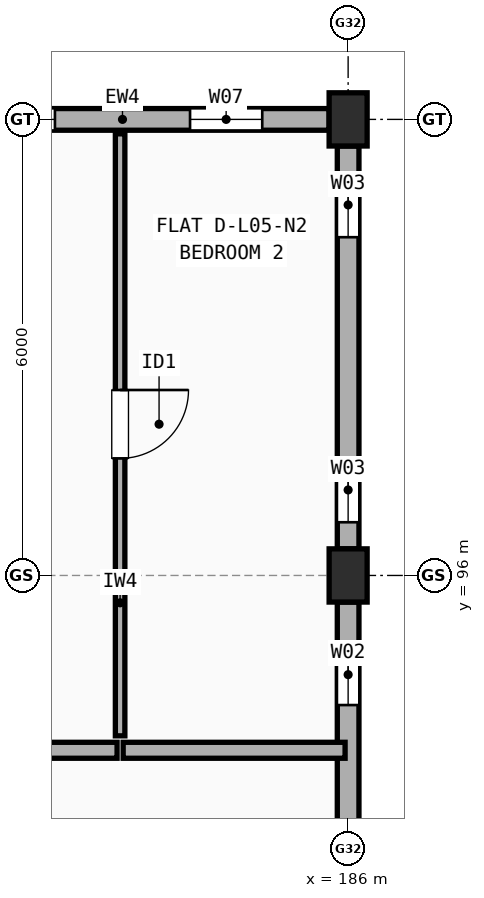
"""IFC4 building model, lengths in metres.
Left out: names, types, materials, properties, quantities, classifications, styles, units other than length and angle.
Written with IfcOpenShell. Run it as: python <this file> out.ifc"""

import sys

from ifc_helpers import new_model, si_unit, direction, frame, frame_2d, origin, origin_2d, place, context, subcontext, project, spatial, rectangle, extrude, element, fill, save


model = new_model("IFC4")
c1 = context("Model", 3, precision=1e-05, world=origin(), true_north=direction((0.0, 1.0)))
c2 = subcontext(c1, "Body", "Model", "MODEL_VIEW")
j1 = project(units=[si_unit("LENGTHUNIT", "METRE"), si_unit("PLANEANGLEUNIT", "RADIAN")], contexts=[c1])
p1 = place(None, origin())
s1 = spatial("IfcSite", under=j1, at=p1, CompositionType="ELEMENT")
p2 = place(p1, origin())
s2 = spatial("IfcBuilding", under=s1, at=p2, CompositionType="ELEMENT")
p3 = place(p2, frame((0.0, 0.0, 17.3)))
s3 = spatial("IfcBuildingStorey", under=s2, at=p3, CompositionType="ELEMENT", Elevation=17.3)
for number, where, z_axis, x_axis in (
    (1, (186.0, 96.0, 0.0), (0.0, 0.0, 1.0), (1.0, 0.0, 0.0)),
    (2, (186.0, 102.0, 0.0), (0.0, 0.0, 1.0), (1.0, 0.0, 0.0)),
):
    element("IfcColumn", number, at=place(p3, frame(where, z_axis=z_axis, x_axis=x_axis)), inside=s3, PredefinedType="COLUMN", context=c2, shape_type="SweptSolid", body=[
        extrude(rectangle(XDim=0.5, YDim=0.7, at=origin_2d()), origin(), (0.0, 0.0, 1.0), 2.965),
    ])
p4 = place(p3, frame((186.0, 90.35, 0.0), z_axis=(0.0, 0.0, 1.0), x_axis=(0.0, 1.0, 0.0)))
e3 = element("IfcWall", 3, at=p4, inside=s3, PredefinedType="STANDARD", context=c2, shape_type="SweptSolid", body=[
    extrude(rectangle(XDim=5.3, YDim=0.285, at=frame_2d((2.65, 0.0))), origin(), (0.0, 0.0, 1.0), 2.447),
])
p5 = place(p4, frame((1.055, 0.0, 0.9)))
e4 = element("IfcOpeningElement", 4, at=p5, cuts=e3, PredefinedType="OPENING", context=c2, shape_type="SweptSolid", body=[
    extrude(rectangle(XDim=1.2, YDim=1.35, at=frame_2d((0.6, 0.675))), frame((0.0, 0.152, 0.0), z_axis=(0.0, -1.0, 0.0), x_axis=(1.0, 0.0, 0.0)), (0.0, 0.0, 1.0), 0.305),
])
p6 = place(p4, frame((3.945, 0.0, 0.9)))
e5 = element("IfcOpeningElement", 5, at=p6, cuts=e3, PredefinedType="OPENING", context=c2, shape_type="SweptSolid", body=[
    extrude(rectangle(XDim=0.8, YDim=1.2, at=frame_2d((0.4, 0.6))), frame((0.0, 0.152, 0.0), z_axis=(0.0, -1.0, 0.0), x_axis=(1.0, 0.0, 0.0)), (0.0, 0.0, 1.0), 0.305),
])
p7 = place(p3, frame((186.0, 96.35, 0.0), z_axis=(0.0, 0.0, 1.0), x_axis=(0.0, 1.0, 0.0)))
e6 = element("IfcWall", 6, at=p7, inside=s3, PredefinedType="STANDARD", context=c2, shape_type="SweptSolid", body=[
    extrude(rectangle(XDim=5.3, YDim=0.285, at=frame_2d((2.65, 0.0))), origin(), (0.0, 0.0, 1.0), 2.447),
])
p8 = place(p7, frame((0.35, 0.0, 0.9)))
e7 = element("IfcOpeningElement", 7, at=p8, cuts=e6, PredefinedType="OPENING", context=c2, shape_type="SweptSolid", body=[
    extrude(rectangle(XDim=0.85, YDim=1.25, at=frame_2d((0.425, 0.625))), frame((0.0, 0.152, 0.0), z_axis=(0.0, -1.0, 0.0), x_axis=(1.0, 0.0, 0.0)), (0.0, 0.0, 1.0), 0.305),
])
p9 = place(p7, frame((4.1, 0.0, 0.9)))
e8 = element("IfcOpeningElement", 8, at=p9, cuts=e6, PredefinedType="OPENING", context=c2, shape_type="SweptSolid", body=[
    extrude(rectangle(XDim=0.85, YDim=1.25, at=frame_2d((0.425, 0.625))), frame((0.0, 0.152, 0.0), z_axis=(0.0, -1.0, 0.0), x_axis=(1.0, 0.0, 0.0)), (0.0, 0.0, 1.0), 0.305),
])
p10 = place(p3, frame((185.75, 102.0, 0.0), z_axis=(0.0, 0.0, 1.0), x_axis=(-1.0, 0.0, 0.0)))
e9 = element("IfcWall", 9, at=p10, inside=s3, PredefinedType="STANDARD", context=c2, shape_type="SweptSolid", body=[
    extrude(rectangle(XDim=5.475, YDim=0.285, at=frame_2d((2.738, 0.0))), origin(), (0.0, 0.0, 1.0), 2.447),
])
p11 = place(p10, frame((0.88, 0.0, 0.9)))
e10 = element("IfcOpeningElement", 10, at=p11, cuts=e9, PredefinedType="OPENING", context=c2, shape_type="SweptSolid", body=[
    extrude(rectangle(XDim=0.95, YDim=1.35, at=frame_2d((0.475, 0.675))), frame((0.0, 0.152, 0.0), z_axis=(0.0, -1.0, 0.0), x_axis=(1.0, 0.0, 0.0)), (0.0, 0.0, 1.0), 0.305),
])
p12 = place(p10, frame((3.607, 0.0, 0.9)))
e11 = element("IfcOpeningElement", 11, at=p12, cuts=e9, PredefinedType="OPENING", context=c2, shape_type="SweptSolid", body=[
    extrude(rectangle(XDim=1.05, YDim=1.35, at=frame_2d((0.525, 0.675))), frame((0.0, 0.152, 0.0), z_axis=(0.0, -1.0, 0.0), x_axis=(1.0, 0.0, 0.0)), (0.0, 0.0, 1.0), 0.305),
])
p13 = place(p3, frame((175.54, 93.7, 0.0), z_axis=(0.0, 0.0, 1.0), x_axis=(1.0, 0.0, 0.0)))
e12 = element("IfcWall", 12, at=p13, inside=s3, PredefinedType="SOLIDWALL", context=c2, shape_type="SweptSolid", body=[
    extrude(rectangle(XDim=7.42, YDim=0.21, at=frame_2d((3.71, 0.0))), origin(), (0.0, 0.0, 1.0), 2.965),
])
p14 = place(p13, frame((3.185, 0.0, 0.0)))
e13 = element("IfcOpeningElement", 13, at=p14, cuts=e12, PredefinedType="OPENING", context=c2, shape_type="SweptSolid", body=[
    extrude(rectangle(XDim=1.05, YDim=2.15, at=frame_2d((0.525, 1.075))), frame((0.0, 0.115, 0.0), z_axis=(0.0, -1.0, 0.0), x_axis=(1.0, 0.0, 0.0)), (0.0, 0.0, 1.0), 0.23),
])
p15 = place(p3, frame((183.04, 93.7, 0.0), z_axis=(0.0, 0.0, 1.0), x_axis=(1.0, 0.0, 0.0)))
e14 = element("IfcWall", 14, at=p15, inside=s3, PredefinedType="SOLIDWALL", context=c2, shape_type="SweptSolid", body=[
    extrude(rectangle(XDim=2.92, YDim=0.21, at=frame_2d((1.46, 0.0))), origin(), (0.0, 0.0, 1.0), 2.447),
])
p16 = place(p3, frame((183.0, 93.89, 0.0), z_axis=(0.0, 0.0, 1.0), x_axis=(0.0, 1.0, 0.0)))
e15 = element("IfcWall", 15, at=p16, inside=s3, PredefinedType="PARTITIONING", context=c2, shape_type="SweptSolid", body=[
    extrude(rectangle(XDim=7.92, YDim=0.125, at=frame_2d((3.96, 0.0))), origin(), (0.0, 0.0, 1.0), 2.548),
])
p17 = place(p16, frame((3.65, 0.0, 0.0)))
e16 = element("IfcOpeningElement", 16, at=p17, cuts=e15, PredefinedType="OPENING", context=c2, shape_type="SweptSolid", body=[
    extrude(rectangle(XDim=0.9, YDim=2.1, at=frame_2d((0.45, 1.05))), frame((0.0, 0.073, 0.0), z_axis=(0.0, -1.0, 0.0), x_axis=(1.0, 0.0, 0.0)), (0.0, 0.0, 1.0), 0.145),
])
p18 = place(p6, origin())
e17 = element("IfcWindow", 17, at=p18, inside=s3, PartitioningType="SINGLE_PANEL", PredefinedType="WINDOW", context=c2, shape_type="SweptSolid", body=[
    extrude(rectangle(XDim=0.8, YDim=1.2, at=frame_2d((0.4, 0.6))), frame((0.0, 0.03, 0.0), z_axis=(0.0, -1.0, 0.0), x_axis=(1.0, 0.0, 0.0)), (0.0, 0.0, 1.0), 0.06),
])
fill(e5, e17)
p19 = place(p8, origin())
e18 = element("IfcWindow", 18, at=p19, inside=s3, PartitioningType="SINGLE_PANEL", PredefinedType="WINDOW", context=c2, shape_type="SweptSolid", body=[
    extrude(rectangle(XDim=0.85, YDim=1.25, at=frame_2d((0.425, 0.625))), frame((0.0, 0.03, 0.0), z_axis=(0.0, -1.0, 0.0), x_axis=(1.0, 0.0, 0.0)), (0.0, 0.0, 1.0), 0.06),
])
fill(e7, e18)
p20 = place(p9, origin())
e19 = element("IfcWindow", 19, at=p20, inside=s3, PartitioningType="SINGLE_PANEL", PredefinedType="WINDOW", context=c2, shape_type="SweptSolid", body=[
    extrude(rectangle(XDim=0.85, YDim=1.25, at=frame_2d((0.425, 0.625))), frame((0.0, 0.03, 0.0), z_axis=(0.0, -1.0, 0.0), x_axis=(1.0, 0.0, 0.0)), (0.0, 0.0, 1.0), 0.06),
])
fill(e8, e19)
p21 = place(p11, origin())
e20 = element("IfcWindow", 20, at=p21, inside=s3, PartitioningType="SINGLE_PANEL", PredefinedType="WINDOW", context=c2, shape_type="SweptSolid", body=[
    extrude(rectangle(XDim=0.95, YDim=1.35, at=frame_2d((0.475, 0.675))), frame((0.0, 0.03, 0.0), z_axis=(0.0, -1.0, 0.0), x_axis=(1.0, 0.0, 0.0)), (0.0, 0.0, 1.0), 0.06),
])
fill(e10, e20)
p22 = place(p12, origin())
e21 = element("IfcWindow", 21, at=p22, inside=s3, PartitioningType="SINGLE_PANEL", PredefinedType="WINDOW", context=c2, shape_type="SweptSolid", body=[
    extrude(rectangle(XDim=1.05, YDim=1.35, at=frame_2d((0.525, 0.675))), frame((0.0, 0.03, 0.0), z_axis=(0.0, -1.0, 0.0), x_axis=(1.0, 0.0, 0.0)), (0.0, 0.0, 1.0), 0.06),
])
fill(e11, e21)
p23 = place(p17, origin())
e22 = element("IfcDoor", 22, at=p23, inside=s3, OperationType="SINGLE_SWING_RIGHT", PredefinedType="DOOR", context=c2, shape_type="SweptSolid", body=[
    extrude(rectangle(XDim=0.9, YDim=2.1, at=frame_2d((0.45, 1.05))), frame((0.0, 0.025, 0.0), z_axis=(0.0, -1.0, 0.0), x_axis=(1.0, 0.0, 0.0)), (0.0, 0.0, 1.0), 0.05),
])
fill(e16, e22)
save(model, sys.argv[1])
